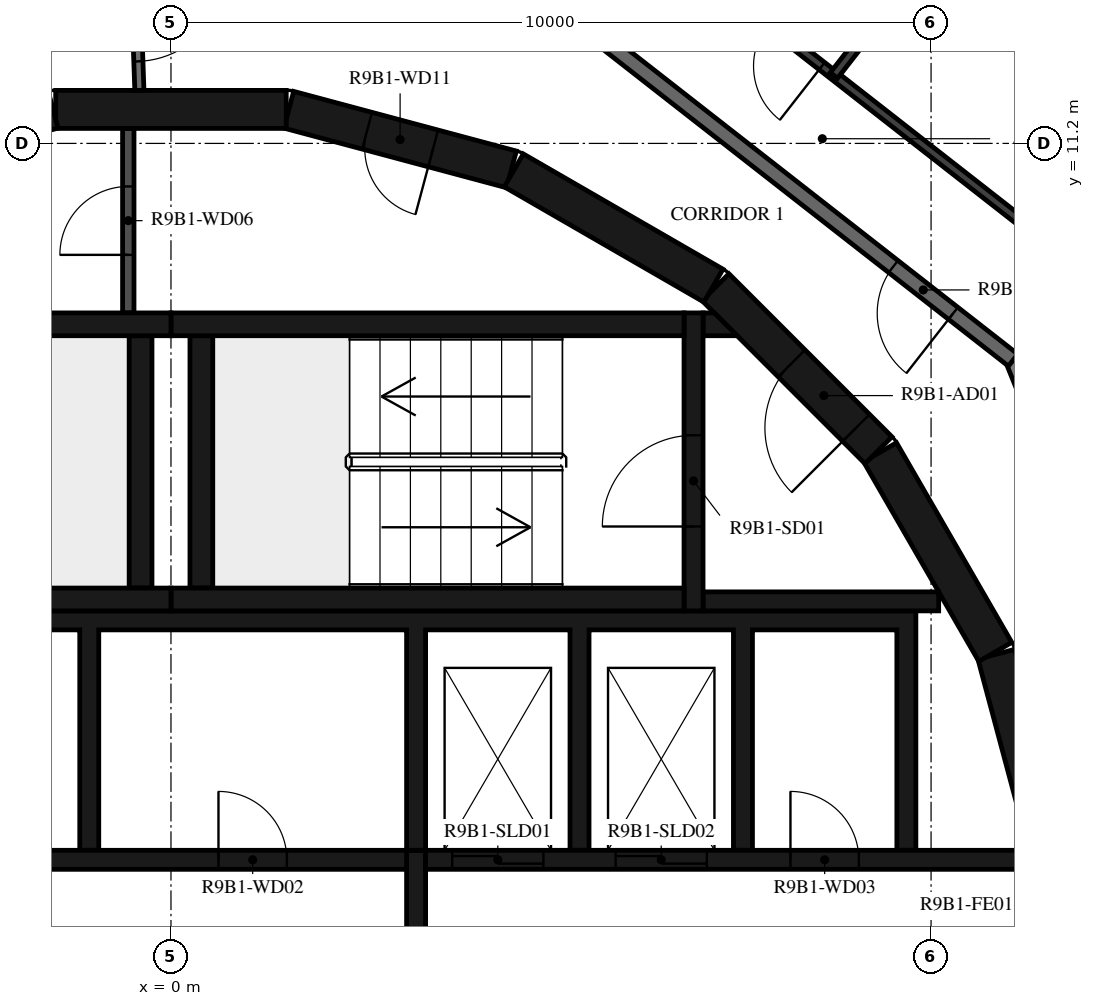
"""IFC4 building model, lengths in metres.
Left out: names, types, materials, properties, quantities, classifications, styles, units other than length and angle.
Written with IfcOpenShell. Run it as: python <this file> out.ifc"""

import sys

from ifc_helpers import new_model, si_unit, direction, frame, frame_2d, origin, place, context, subcontext, project, spatial, polyline, rectangle, outline, extrude, element, fill, save


model = new_model("IFC4")
c1 = context("Model", 3, precision=1e-05, world=origin(), true_north=direction((0.0, 1.0)))
c2 = subcontext(c1, "Body", "Model", "MODEL_VIEW")
j1 = project(units=[si_unit("LENGTHUNIT", "METRE"), si_unit("PLANEANGLEUNIT", "RADIAN")], contexts=[c1])
p1 = place(None, origin())
s1 = spatial("IfcSite", under=j1, at=p1, CompositionType="ELEMENT")
p2 = place(p1, origin())
s2 = spatial("IfcBuilding", under=s1, at=p2, CompositionType="ELEMENT")
p3 = place(p2, frame((0.0, 0.0, 350.5)))
s3 = spatial("IfcBuildingStorey", under=s2, at=p3, CompositionType="ELEMENT", Elevation=350.5)
for number, where, z_axis, x_axis in (
    (1, (11.643, 1.55, 0.0), (0.0, 0.0, 1.0), (-0.259, 0.966, 0.0)),
    (2, (10.845, 4.51, 0.0), (0.0, 0.0, 1.0), (-0.5, 0.866, 0.0)),
):
    element("IfcWall", number, at=place(p3, frame(where, z_axis=z_axis, x_axis=x_axis)), inside=s3, PredefinedType="SHEAR", context=c2, shape_type="SweptSolid", body=[
        extrude(rectangle(XDim=3.033, YDim=0.5, at=frame_2d((1.516, 0.0))), origin(), (0.0, 0.0, 1.0), 3.12),
    ])
p4 = place(p3, frame((9.308, 7.164, 0.0), z_axis=(0.0, 0.0, 1.0), x_axis=(-0.707106781187, 0.707106781187, 0.0)))
e3 = element("IfcWall", 3, at=p4, inside=s3, PredefinedType="SHEAR", context=c2, shape_type="SweptSolid", body=[
    extrude(rectangle(XDim=3.032, YDim=0.5, at=frame_2d((1.516, 0.0))), origin(), (0.0, 0.0, 1.0), 3.12),
])
p5 = place(p4, frame((0.416, 0.0, 0.0)))
e4 = element("IfcOpeningElement", 4, at=p5, cuts=e3, PredefinedType="OPENING", context=c2, shape_type="SweptSolid", body=[
    extrude(rectangle(XDim=1.2, YDim=2.1, at=frame_2d((0.6, 1.05))), frame((0.0, 0.26, 0.0), z_axis=(0.0, -1.0, 0.0), x_axis=(1.0, 0.0, 0.0)), (0.0, 0.0, 1.0), 0.52),
])
p6 = place(p3, frame((7.137, 9.329, 0.0), z_axis=(0.0, 0.0, 1.0), x_axis=(-0.865975092491, 0.500087131594, 0.0)))
e5 = element("IfcWall", 5, at=p6, inside=s3, PredefinedType="SHEAR", context=c2, shape_type="SweptSolid", body=[
    extrude(rectangle(XDim=3.033, YDim=0.5, at=frame_2d((1.516, 0.0))), origin(), (0.0, 0.0, 1.0), 3.12),
])
p7 = place(p3, frame((4.479, 10.858, 0.0), z_axis=(0.0, 0.0, 1.0), x_axis=(-0.965948410781, 0.258734743916, 0.0)))
e6 = element("IfcWall", 6, at=p7, inside=s3, PredefinedType="SHEAR", context=c2, shape_type="SweptSolid", body=[
    extrude(rectangle(XDim=3.033, YDim=0.5, at=frame_2d((1.516, 0.0))), origin(), (0.0, 0.0, 1.0), 3.12),
])
p8 = place(p7, frame((1.066, 0.0, 0.0)))
e7 = element("IfcOpeningElement", 7, at=p8, cuts=e6, PredefinedType="OPENING", context=c2, shape_type="SweptSolid", body=[
    extrude(rectangle(XDim=0.9, YDim=2.1, at=frame_2d((0.45, 1.05))), frame((0.0, 0.26, 0.0), z_axis=(0.0, -1.0, 0.0), x_axis=(1.0, 0.0, 0.0)), (0.0, 0.0, 1.0), 0.52),
])
for number, where, z_axis, x_axis in (
    (8, (1.516, 11.647, 0.0), (0.0, 0.0, 1.0), (-1.0, 0.0, 0.0)),
    (9, (-1.55, 11.643, 0.0), (0.0, 0.0, 1.0), (-0.966, -0.259, 0.0)),
):
    element("IfcWall", number, at=place(p3, frame(where, z_axis=z_axis, x_axis=x_axis)), inside=s3, PredefinedType="SHEAR", context=c2, shape_type="SweptSolid", body=[
        extrude(rectangle(XDim=3.033, YDim=0.5, at=frame_2d((1.516, 0.0))), origin(), (0.0, 0.0, 1.0), 3.12),
    ])
for number, where, z_axis, x_axis in (
    (10, (0.0, 5.2, 0.0), (0.0, 0.0, 1.0), (1.0, 0.0, 0.0)),
    (11, (0.0, 8.82, 0.0), (0.0, 0.0, 1.0), (1.0, 0.0, 0.0)),
):
    element("IfcWall", number, at=place(p3, frame(where, z_axis=z_axis, x_axis=x_axis)), inside=s3, PredefinedType="SHEAR", context=c2, shape_type="SweptSolid", body=[
        extrude(rectangle(XDim=6.75, YDim=0.3, at=frame_2d((3.375, 0.0))), origin(), (0.0, 0.0, 1.0), 3.12),
    ])
p9 = place(p3, frame((0.4, 5.35, 0.0), z_axis=(0.0, 0.0, 1.0), x_axis=(0.0, 1.0, 0.0)))
e12 = element("IfcWall", 12, at=p9, inside=s3, PredefinedType="SHEAR", context=c2, shape_type="SweptSolid", body=[
    extrude(rectangle(XDim=3.32, YDim=0.3, at=frame_2d((1.66, 0.0))), origin(), (0.0, 0.0, 1.0), 3.12),
])
p10 = place(p3, frame((6.875, 5.05, 0.0), z_axis=(0.0, 0.0, 1.0), x_axis=(0.0, 1.0, 0.0)))
e13 = element("IfcWall", 13, at=p10, inside=s3, PredefinedType="SHEAR", context=c2, shape_type="SweptSolid", body=[
    extrude(rectangle(XDim=3.92, YDim=0.25, at=frame_2d((1.96, 0.0))), origin(), (0.0, 0.0, 1.0), 3.12),
])
p11 = place(p10, frame((1.11, 0.0, 0.0)))
e14 = element("IfcOpeningElement", 14, at=p11, cuts=e13, PredefinedType="OPENING", context=c2, shape_type="SweptSolid", body=[
    extrude(rectangle(XDim=1.2, YDim=2.1, at=frame_2d((0.6, 1.05))), frame((0.0, 0.135, 0.0), z_axis=(0.0, -1.0, 0.0), x_axis=(1.0, 0.0, 0.0)), (0.0, 0.0, 1.0), 0.27),
])
p12 = place(p3, frame((7.0, 5.175, 0.0), z_axis=(0.0, 0.0, 1.0), x_axis=(1.0, 0.0, 0.0)))
e15 = element("IfcWall", 15, at=p12, inside=s3, PredefinedType="SHEAR", context=c2, shape_type="SweptSolid", body=[
    extrude(rectangle(XDim=3.1, YDim=0.25, at=frame_2d((1.55, 0.0))), origin(), (0.0, 0.0, 1.0), 3.12),
])
p13 = place(p3, origin())
e16 = element("IfcWall", 16, at=p13, inside=s3, PredefinedType="SHEAR", context=c2, shape_type="SweptSolid", body=[
    extrude(outline(polyline([(7.448, 8.67), (7.0, 8.67), (7.0, 8.97), (7.148, 8.97), (7.448, 8.67)])), origin(), (0.0, 0.0, 1.0), 3.12),
])
for number, where, z_axis, x_axis in (
    (17, (-6.75, 5.2, 0.0), (0.0, 0.0, 1.0), (1.0, 0.0, 0.0)),
    (18, (-6.75, 8.82, 0.0), (0.0, 0.0, 1.0), (1.0, 0.0, 0.0)),
):
    element("IfcWall", number, at=place(p3, frame(where, z_axis=z_axis, x_axis=x_axis)), inside=s3, PredefinedType="SHEAR", context=c2, shape_type="SweptSolid", body=[
        extrude(rectangle(XDim=6.75, YDim=0.3, at=frame_2d((3.375, 0.0))), origin(), (0.0, 0.0, 1.0), 3.12),
    ])
p14 = place(p3, frame((-0.4, 5.35, 0.0), z_axis=(0.0, 0.0, 1.0), x_axis=(0.0, 1.0, 0.0)))
e19 = element("IfcWall", 19, at=p14, inside=s3, PredefinedType="SHEAR", context=c2, shape_type="SweptSolid", body=[
    extrude(rectangle(XDim=3.32, YDim=0.3, at=frame_2d((1.66, 0.0))), origin(), (0.0, 0.0, 1.0), 3.12),
])
p15 = place(p3, origin())
e20 = element("IfcWall", 20, at=p15, inside=s3, PredefinedType="SHEAR", context=c2, shape_type="SweptSolid", body=[
    extrude(outline(polyline([(-9.8, 1.9), (-9.55, 1.9), (-9.55, 4.8), (-1.2, 4.8), (-1.2, 1.9), (-0.95, 1.9), (-0.95, 4.8), (3.1, 4.8), (3.1, 1.9), (3.35, 1.9), (3.35, 4.8), (5.25, 4.8), (5.25, 1.9), (5.5, 1.9), (5.5, 4.8), (7.4, 4.8), (7.4, 1.9), (7.65, 1.9), (7.65, 4.8), (9.55, 4.8), (9.55, 1.9), (9.8, 1.9), (9.8, 4.8), (9.8, 5.05), (-9.8, 5.05), (-9.8, 4.8), (-9.8, 1.9)])), origin(), (0.0, 0.0, 1.0), 3.12),
])
p16 = place(p3, frame((-11.28, 1.775, 0.0), z_axis=(0.0, 0.0, 1.0), x_axis=(1.0, 0.0, 0.0)))
e21 = element("IfcWall", 21, at=p16, inside=s3, PredefinedType="SHEAR", context=c2, shape_type="SweptSolid", body=[
    extrude(rectangle(XDim=14.38, YDim=0.25, at=frame_2d((7.19, 0.0))), origin(), (0.0, 0.0, 1.0), 3.12),
])
p17 = place(p16, frame((5.455, 0.0, 0.0)))
e22 = element("IfcOpeningElement", 22, at=p17, cuts=e21, PredefinedType="OPENING", context=c2, shape_type="SweptSolid", body=[
    extrude(rectangle(XDim=0.9, YDim=2.1, at=frame_2d((0.45, 1.05))), frame((0.0, 0.135, 0.0), z_axis=(0.0, -1.0, 0.0), x_axis=(1.0, 0.0, 0.0)), (0.0, 0.0, 1.0), 0.27),
])
p18 = place(p16, frame((11.905, 0.0, 0.0)))
e23 = element("IfcOpeningElement", 23, at=p18, cuts=e21, PredefinedType="OPENING", context=c2, shape_type="SweptSolid", body=[
    extrude(rectangle(XDim=0.9, YDim=2.1, at=frame_2d((0.45, 1.05))), frame((0.0, 0.135, 0.0), z_axis=(0.0, -1.0, 0.0), x_axis=(1.0, 0.0, 0.0)), (0.0, 0.0, 1.0), 0.27),
])
p19 = place(p3, frame((3.35, 1.775, 0.0), z_axis=(0.0, 0.0, 1.0), x_axis=(1.0, 0.0, 0.0)))
e24 = element("IfcWall", 24, at=p19, inside=s3, PredefinedType="SHEAR", context=c2, shape_type="SweptSolid", body=[
    extrude(rectangle(XDim=7.93, YDim=0.25, at=frame_2d((3.965, 0.0))), origin(), (0.0, 0.0, 1.0), 3.12),
])
p20 = place(p19, frame((0.35, 0.0, 0.0)))
e25 = element("IfcOpeningElement", 25, at=p20, cuts=e24, PredefinedType="OPENING", context=c2, shape_type="SweptSolid", body=[
    extrude(rectangle(XDim=1.2, YDim=2.4, at=frame_2d((0.6, 1.2))), frame((0.0, 0.135, 0.0), z_axis=(0.0, -1.0, 0.0), x_axis=(1.0, 0.0, 0.0)), (0.0, 0.0, 1.0), 0.27),
])
p21 = place(p19, frame((2.5, 0.0, 0.0)))
e26 = element("IfcOpeningElement", 26, at=p21, cuts=e24, PredefinedType="OPENING", context=c2, shape_type="SweptSolid", body=[
    extrude(rectangle(XDim=1.2, YDim=2.4, at=frame_2d((0.6, 1.2))), frame((0.0, 0.135, 0.0), z_axis=(0.0, -1.0, 0.0), x_axis=(1.0, 0.0, 0.0)), (0.0, 0.0, 1.0), 0.27),
])
p22 = place(p19, frame((4.8, 0.0, 0.0)))
e27 = element("IfcOpeningElement", 27, at=p22, cuts=e24, PredefinedType="OPENING", context=c2, shape_type="SweptSolid", body=[
    extrude(rectangle(XDim=0.9, YDim=2.1, at=frame_2d((0.45, 1.05))), frame((0.0, 0.135, 0.0), z_axis=(0.0, -1.0, 0.0), x_axis=(1.0, 0.0, 0.0)), (0.0, 0.0, 1.0), 0.27),
])
p23 = place(p3, frame((3.225, -1.9, 0.0), z_axis=(0.0, 0.0, 1.0), x_axis=(0.0, 1.0, 0.0)))
e28 = element("IfcWall", 28, at=p23, inside=s3, PredefinedType="SHEAR", context=c2, shape_type="SweptSolid", body=[
    extrude(rectangle(XDim=3.8, YDim=0.25, at=frame_2d((1.9, 0.0))), origin(), (0.0, 0.0, 1.0), 3.12),
])
p24 = place(p3, frame((-0.562, 8.97, 0.0), z_axis=(0.0, 0.0, 1.0), x_axis=(0.0, 1.0, 0.0)))
e29 = element("IfcWall", 29, at=p24, inside=s3, PredefinedType="PARTITIONING", context=c2, shape_type="SweptSolid", body=[
    extrude(rectangle(XDim=2.427, YDim=0.15, at=frame_2d((1.214, 0.0))), origin(), (0.0, 0.0, 1.0), 3.12),
])
p25 = place(p24, frame((0.764, 0.0, 0.0)))
e30 = element("IfcOpeningElement", 30, at=p25, cuts=e29, PredefinedType="OPENING", context=c2, shape_type="SweptSolid", body=[
    extrude(rectangle(XDim=0.9, YDim=2.1, at=frame_2d((0.45, 1.05))), frame((0.0, 0.085, 0.0), z_axis=(0.0, -1.0, 0.0), x_axis=(1.0, 0.0, 0.0)), (0.0, 0.0, 1.0), 0.17),
])
p26 = place(p3, frame((-0.475, 13.598, 0.0), z_axis=(0.0, 0.0, 1.0), x_axis=(0.034852521429, -0.999392466326, 0.0)))
e31 = element("IfcWall", 31, at=p26, inside=s3, PredefinedType="PARTITIONING", context=c2, shape_type="SweptSolid", body=[
    extrude(rectangle(XDim=1.702, YDim=0.12, at=frame_2d((0.851, 0.0))), origin(), (0.0, 0.0, 1.0), 3.12),
])
p27 = place(p26, frame((0.12, 0.0, 0.0)))
e32 = element("IfcOpeningElement", 32, at=p27, cuts=e31, PredefinedType="OPENING", context=c2, shape_type="SweptSolid", body=[
    extrude(rectangle(XDim=1.2, YDim=2.1, at=frame_2d((0.6, 1.05))), frame((0.0, 0.07, 0.0), z_axis=(0.0, -1.0, 0.0), x_axis=(1.0, 0.0, 0.0)), (0.0, 0.0, 1.0), 0.14),
])
p28 = place(p3, frame((13.769, 1.691, 0.0), z_axis=(0.0, 0.0, 1.0), x_axis=(-0.374618189599, 0.92717916932, 0.0)))
e33 = element("IfcWall", 33, at=p28, inside=s3, PredefinedType="STANDARD", context=c2, shape_type="SweptSolid", body=[
    extrude(rectangle(XDim=7.181, YDim=0.2, at=frame_2d((3.591, 0.0))), origin(), (0.0, 0.0, 1.0), 3.12),
])
p29 = place(p28, frame((2.371, 0.0, 0.0)))
e34 = element("IfcOpeningElement", 34, at=p29, cuts=e33, PredefinedType="OPENING", context=c2, shape_type="SweptSolid", body=[
    extrude(rectangle(XDim=1.0, YDim=2.1, at=frame_2d((0.5, 1.05))), frame((0.0, 0.11, 0.0), z_axis=(0.0, -1.0, 0.0), x_axis=(1.0, 0.0, 0.0)), (0.0, 0.0, 1.0), 0.22),
])
p30 = place(p3, frame((11.079, 8.349, 0.0), z_axis=(0.0, 0.0, 1.0), x_axis=(-0.78800478687, 0.615669112324, 0.0)))
e35 = element("IfcWall", 35, at=p30, inside=s3, PredefinedType="STANDARD", context=c2, shape_type="SweptSolid", body=[
    extrude(rectangle(XDim=7.181, YDim=0.2, at=frame_2d((3.591, 0.0))), origin(), (0.0, 0.0, 1.0), 3.12),
])
p31 = place(p30, frame((1.0, 0.0, 0.0)))
e36 = element("IfcOpeningElement", 36, at=p31, cuts=e35, PredefinedType="OPENING", context=c2, shape_type="SweptSolid", body=[
    extrude(rectangle(XDim=1.0, YDim=2.1, at=frame_2d((0.5, 1.05))), frame((0.0, 0.11, 0.0), z_axis=(0.0, -1.0, 0.0), x_axis=(1.0, 0.0, 0.0)), (0.0, 0.0, 1.0), 0.22),
])
p32 = place(p3, frame((12.319, 9.283, 0.0), z_axis=(0.0, 0.0, 1.0), x_axis=(-0.788000268464, 0.61567489546, 0.0)))
e37 = element("IfcWall", 37, at=p32, inside=s3, PredefinedType="PARTITIONING", context=c2, shape_type="SweptSolid", body=[
    extrude(rectangle(XDim=7.985, YDim=0.12, at=frame_2d((3.992, 0.0))), origin(), (0.0, 0.0, 1.0), 3.12),
])
p33 = place(p32, frame((4.765, 0.0, 0.0)))
e38 = element("IfcOpeningElement", 38, at=p33, cuts=e37, PredefinedType="OPENING", context=c2, shape_type="SweptSolid", body=[
    extrude(rectangle(XDim=0.9, YDim=2.1, at=frame_2d((0.45, 1.05))), frame((0.0, 0.07, 0.0), z_axis=(0.0, -1.0, 0.0), x_axis=(1.0, 0.0, 0.0)), (0.0, 0.0, 1.0), 0.14),
])
p34 = place(p3, frame((11.315, 15.414, 0.0), z_axis=(0.0, 0.0, 1.0), x_axis=(-0.615656413137, -0.788014708596, 0.0)))
e39 = element("IfcWall", 39, at=p34, inside=s3, PredefinedType="PARTITIONING", context=c2, shape_type="SweptSolid", body=[
    extrude(rectangle(XDim=4.213, YDim=0.12, at=frame_2d((2.106, 0.0))), origin(), (0.0, 0.0, 1.0), 3.12),
])
p35 = place(p11, origin())
e40 = element("IfcDoor", 40, at=p35, inside=s3, OperationType="SINGLE_SWING_LEFT", PredefinedType="DOOR", context=c2, shape_type="SweptSolid", body=[
    extrude(rectangle(XDim=1.2, YDim=2.1, at=frame_2d((0.6, 1.05))), frame((0.0, 0.025, 0.0), z_axis=(0.0, -1.0, 0.0), x_axis=(1.0, 0.0, 0.0)), (0.0, 0.0, 1.0), 0.05),
])
fill(e14, e40)
p36 = place(p5, origin())
e41 = element("IfcDoor", 41, at=p36, inside=s3, OperationType="SINGLE_SWING_RIGHT", PredefinedType="DOOR", context=c2, shape_type="SweptSolid", body=[
    extrude(rectangle(XDim=1.2, YDim=2.1, at=frame_2d((0.6, 1.05))), frame((0.0, 0.025, 0.0), z_axis=(0.0, -1.0, 0.0), x_axis=(1.0, 0.0, 0.0)), (0.0, 0.0, 1.0), 0.05),
])
fill(e4, e41)
p37 = place(p20, origin())
e42 = element("IfcDoor", 42, at=p37, inside=s3, OperationType="DOUBLE_DOOR_SLIDING", PredefinedType="DOOR", context=c2, shape_type="SweptSolid", body=[
    extrude(rectangle(XDim=1.2, YDim=2.4, at=frame_2d((0.6, 1.2))), frame((0.0, 0.025, 0.0), z_axis=(0.0, -1.0, 0.0), x_axis=(1.0, 0.0, 0.0)), (0.0, 0.0, 1.0), 0.05),
])
fill(e25, e42)
p38 = place(p21, origin())
e43 = element("IfcDoor", 43, at=p38, inside=s3, OperationType="DOUBLE_DOOR_SLIDING", PredefinedType="DOOR", context=c2, shape_type="SweptSolid", body=[
    extrude(rectangle(XDim=1.2, YDim=2.4, at=frame_2d((0.6, 1.2))), frame((0.0, 0.025, 0.0), z_axis=(0.0, -1.0, 0.0), x_axis=(1.0, 0.0, 0.0)), (0.0, 0.0, 1.0), 0.05),
])
fill(e26, e43)
p39 = place(p18, origin())
e44 = element("IfcDoor", 44, at=p39, inside=s3, OperationType="SINGLE_SWING_RIGHT", PredefinedType="DOOR", context=c2, shape_type="SweptSolid", body=[
    extrude(rectangle(XDim=0.9, YDim=2.1, at=frame_2d((0.45, 1.05))), frame((0.0, 0.025, 0.0), z_axis=(0.0, -1.0, 0.0), x_axis=(1.0, 0.0, 0.0)), (0.0, 0.0, 1.0), 0.05),
])
fill(e23, e44)
p40 = place(p22, origin())
e45 = element("IfcDoor", 45, at=p40, inside=s3, OperationType="SINGLE_SWING_LEFT", PredefinedType="DOOR", context=c2, shape_type="SweptSolid", body=[
    extrude(rectangle(XDim=0.9, YDim=2.1, at=frame_2d((0.45, 1.05))), frame((0.0, 0.025, 0.0), z_axis=(0.0, -1.0, 0.0), x_axis=(1.0, 0.0, 0.0)), (0.0, 0.0, 1.0), 0.05),
])
fill(e27, e45)
p41 = place(p25, origin())
e46 = element("IfcDoor", 46, at=p41, inside=s3, OperationType="SINGLE_SWING_RIGHT", PredefinedType="DOOR", context=c2, shape_type="SweptSolid", body=[
    extrude(rectangle(XDim=0.9, YDim=2.1, at=frame_2d((0.45, 1.05))), frame((0.0, 0.025, 0.0), z_axis=(0.0, -1.0, 0.0), x_axis=(1.0, 0.0, 0.0)), (0.0, 0.0, 1.0), 0.05),
])
fill(e30, e46)
p42 = place(p8, origin())
e47 = element("IfcDoor", 47, at=p42, inside=s3, OperationType="SINGLE_SWING_LEFT", PredefinedType="DOOR", context=c2, shape_type="SweptSolid", body=[
    extrude(rectangle(XDim=0.9, YDim=2.1, at=frame_2d((0.45, 1.05))), frame((0.0, 0.025, 0.0), z_axis=(0.0, -1.0, 0.0), x_axis=(1.0, 0.0, 0.0)), (0.0, 0.0, 1.0), 0.05),
])
fill(e7, e47)
p43 = place(p31, origin())
e48 = element("IfcDoor", 48, at=p43, inside=s3, OperationType="SINGLE_SWING_LEFT", PredefinedType="DOOR", context=c2, shape_type="SweptSolid", body=[
    extrude(rectangle(XDim=1.0, YDim=2.1, at=frame_2d((0.5, 1.05))), frame((0.0, 0.025, 0.0), z_axis=(0.0, -1.0, 0.0), x_axis=(1.0, 0.0, 0.0)), (0.0, 0.0, 1.0), 0.05),
])
fill(e36, e48)
p44 = place(p33, origin())
e49 = element("IfcDoor", 49, at=p44, inside=s3, OperationType="SINGLE_SWING_LEFT", PredefinedType="DOOR", context=c2, shape_type="SweptSolid", body=[
    extrude(rectangle(XDim=0.9, YDim=2.1, at=frame_2d((0.45, 1.05))), frame((0.0, 0.025, 0.0), z_axis=(0.0, -1.0, 0.0), x_axis=(1.0, 0.0, 0.0)), (0.0, 0.0, 1.0), 0.05),
])
fill(e38, e49)
p45 = place(p27, origin())
e50 = element("IfcDoor", 50, at=p45, inside=s3, OperationType="DOUBLE_DOOR_SINGLE_SWING", PredefinedType="DOOR", context=c2, shape_type="SweptSolid", body=[
    extrude(rectangle(XDim=1.2, YDim=2.1, at=frame_2d((0.6, 1.05))), frame((0.0, 0.025, 0.0), z_axis=(0.0, -1.0, 0.0), x_axis=(1.0, 0.0, 0.0)), (0.0, 0.0, 1.0), 0.05),
])
fill(e32, e50)
save(model, sys.argv[1])
